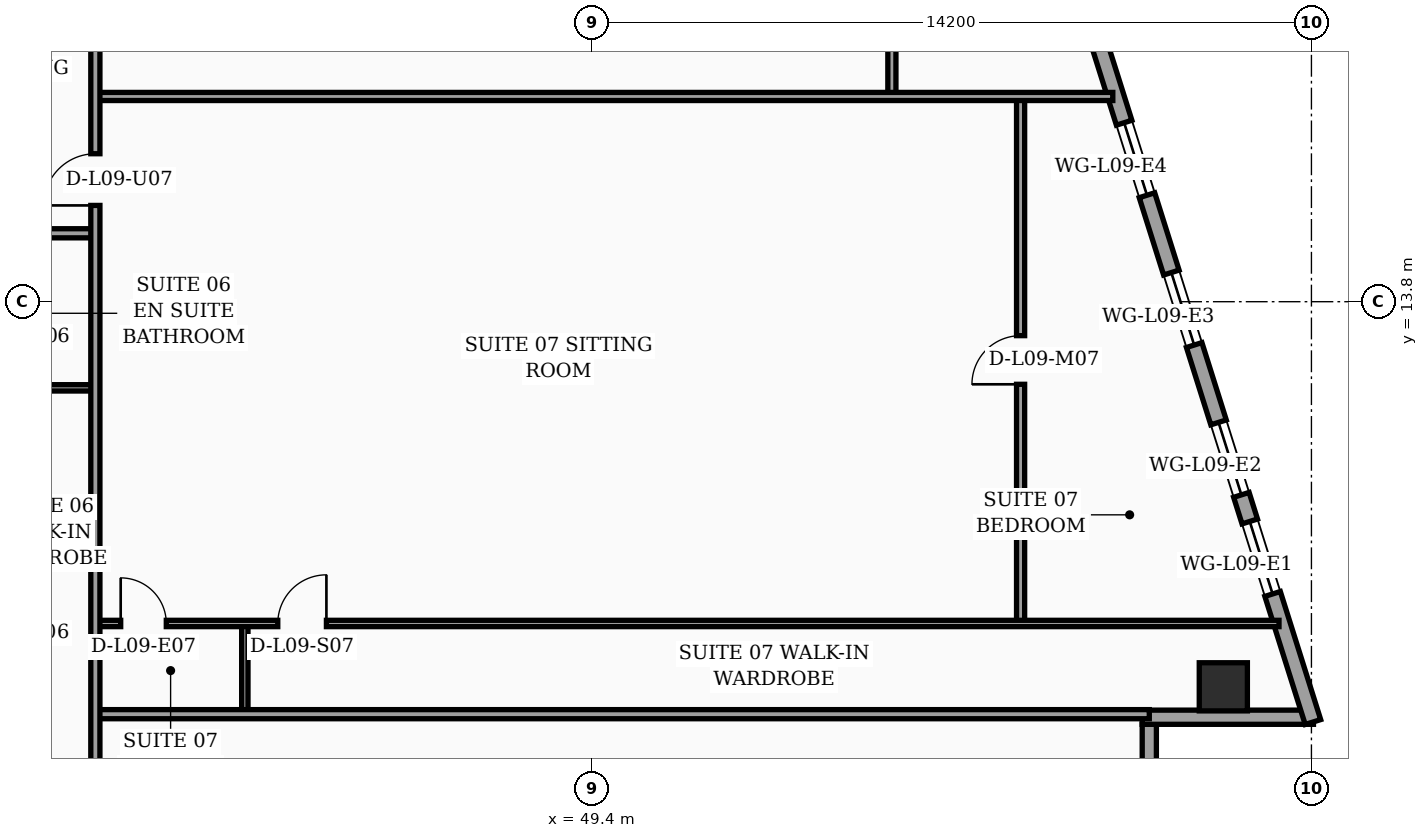
"""IFC4 building model, lengths in metres.
Left out: names, types, materials, properties, quantities, classifications, styles, units other than length and angle.
Written with IfcOpenShell. Run it as: python <this file> out.ifc"""

import sys

from ifc_helpers import new_model, si_unit, direction, frame, frame_2d, origin, origin_2d, place, context, subcontext, project, spatial, rectangle, hollow_rectangle, extrude, element, fill, save


model = new_model("IFC4")
c1 = context("Model", 3, precision=1e-05, world=origin(), true_north=direction((0.0, 1.0)))
c2 = subcontext(c1, "Body", "Model", "MODEL_VIEW")
j1 = project(units=[si_unit("LENGTHUNIT", "METRE"), si_unit("PLANEANGLEUNIT", "RADIAN")], contexts=[c1])
p1 = place(None, origin())
s1 = spatial("IfcSite", under=j1, at=p1, CompositionType="ELEMENT")
p2 = place(p1, origin())
s2 = spatial("IfcBuilding", under=s1, at=p2, CompositionType="ELEMENT")
p3 = place(p2, frame((0.0, 0.0, 42.2)))
s3 = spatial("IfcBuildingStorey", under=s2, at=p3, CompositionType="ELEMENT", Elevation=42.2)
p4 = place(p3, frame((61.861, 6.2, 0.0), z_axis=(0.0, 0.0, 1.0), x_axis=(1.0, 0.0, 0.0)))
e1 = element("IfcColumn", 1, at=p4, inside=s3, PredefinedType="COLUMN", context=c2, shape_type="SweptSolid", body=[
    extrude(hollow_rectangle(XDim=0.95, YDim=0.95, WallThickness=0.04, at=origin_2d()), origin(), (0.0, 0.0, 1.0), 3.52),
])
p5 = place(p3, frame((60.4, 2.52, 0.0), z_axis=(0.0, 0.0, 1.0), x_axis=(0.0, 1.0, 0.0)))
e2 = element("IfcWall", 2, at=p5, inside=s3, PredefinedType="SOLIDWALL", context=c2, shape_type="SweptSolid", body=[
    extrude(rectangle(XDim=2.94, YDim=0.28, at=frame_2d((1.47, 0.0))), origin(), (0.0, 0.0, 1.0), 3.02),
])
p6 = place(p3, frame((60.26, 5.6, 0.0), z_axis=(0.0, 0.0, 1.0), x_axis=(1.0, 0.0, 0.0)))
e3 = element("IfcWall", 3, at=p6, inside=s3, PredefinedType="SOLIDWALL", context=c2, shape_type="SweptSolid", body=[
    extrude(rectangle(XDim=3.38, YDim=0.28, at=frame_2d((1.69, 0.0))), origin(), (0.0, 0.0, 1.0), 3.02),
])
p7 = place(p3, frame((63.63, 5.505, 0.0), z_axis=(0.0, 0.0, 1.0), x_axis=(-0.300501856448, 0.953781229775, 0.0)))
e4 = element("IfcWall", 4, at=p7, inside=s3, PredefinedType="SOLIDWALL", context=c2, shape_type="SweptSolid", body=[
    extrude(rectangle(XDim=30.814, YDim=0.32, at=frame_2d((15.407, 0.0))), origin(), (0.0, 0.0, 1.0), 3.52),
])
p8 = place(p7, frame((18.796, 0.0, 0.0)))
e5 = element("IfcOpeningElement", 5, at=p8, cuts=e4, PredefinedType="OPENING", context=c2, shape_type="SweptSolid", body=[
    extrude(rectangle(XDim=1.4, YDim=2.25, at=frame_2d((0.7, 1.125))), frame((0.0, 0.17, 0.0), z_axis=(0.0, -1.0, 0.0), x_axis=(1.0, 0.0, 0.0)), (0.0, 0.0, 1.0), 0.34),
])
p9 = place(p7, frame((2.65, 0.0, 0.75)))
e6 = element("IfcOpeningElement", 6, at=p9, cuts=e4, PredefinedType="OPENING", context=c2, shape_type="SweptSolid", body=[
    extrude(rectangle(XDim=1.5, YDim=1.6, at=frame_2d((0.75, 0.8))), frame((0.0, 0.17, 0.0), z_axis=(0.0, -1.0, 0.0), x_axis=(1.0, 0.0, 0.0)), (0.0, 0.0, 1.0), 0.34),
])
p10 = place(p7, frame((4.7, 0.0, 0.75)))
e7 = element("IfcOpeningElement", 7, at=p10, cuts=e4, PredefinedType="OPENING", context=c2, shape_type="SweptSolid", body=[
    extrude(rectangle(XDim=1.5, YDim=1.6, at=frame_2d((0.75, 0.8))), frame((0.0, 0.17, 0.0), z_axis=(0.0, -1.0, 0.0), x_axis=(1.0, 0.0, 0.0)), (0.0, 0.0, 1.0), 0.34),
])
p11 = place(p7, frame((7.8, 0.0, 0.75)))
e8 = element("IfcOpeningElement", 8, at=p11, cuts=e4, PredefinedType="OPENING", context=c2, shape_type="SweptSolid", body=[
    extrude(rectangle(XDim=1.5, YDim=1.6, at=frame_2d((0.75, 0.8))), frame((0.0, 0.17, 0.0), z_axis=(0.0, -1.0, 0.0), x_axis=(1.0, 0.0, 0.0)), (0.0, 0.0, 1.0), 0.34),
])
p12 = place(p7, frame((10.9, 0.0, 0.75)))
e9 = element("IfcOpeningElement", 9, at=p12, cuts=e4, PredefinedType="OPENING", context=c2, shape_type="SweptSolid", body=[
    extrude(rectangle(XDim=1.5, YDim=1.6, at=frame_2d((0.75, 0.8))), frame((0.0, 0.17, 0.0), z_axis=(0.0, -1.0, 0.0), x_axis=(1.0, 0.0, 0.0)), (0.0, 0.0, 1.0), 0.34),
])
p13 = place(p7, frame((14.0, 0.0, 0.75)))
e10 = element("IfcOpeningElement", 10, at=p13, cuts=e4, PredefinedType="OPENING", context=c2, shape_type="SweptSolid", body=[
    extrude(rectangle(XDim=1.5, YDim=1.6, at=frame_2d((0.75, 0.8))), frame((0.0, 0.17, 0.0), z_axis=(0.0, -1.0, 0.0), x_axis=(1.0, 0.0, 0.0)), (0.0, 0.0, 1.0), 0.34),
])
p14 = place(p7, frame((16.55, 0.0, 0.75)))
e11 = element("IfcOpeningElement", 11, at=p14, cuts=e4, PredefinedType="OPENING", context=c2, shape_type="SweptSolid", body=[
    extrude(rectangle(XDim=1.5, YDim=1.6, at=frame_2d((0.75, 0.8))), frame((0.0, 0.17, 0.0), z_axis=(0.0, -1.0, 0.0), x_axis=(1.0, 0.0, 0.0)), (0.0, 0.0, 1.0), 0.34),
])
p15 = place(p7, frame((23.3, 0.0, 0.75)))
e12 = element("IfcOpeningElement", 12, at=p15, cuts=e4, PredefinedType="OPENING", context=c2, shape_type="SweptSolid", body=[
    extrude(rectangle(XDim=1.5, YDim=1.6, at=frame_2d((0.75, 0.8))), frame((0.0, 0.17, 0.0), z_axis=(0.0, -1.0, 0.0), x_axis=(1.0, 0.0, 0.0)), (0.0, 0.0, 1.0), 0.34),
])
p16 = place(p7, frame((27.45, 0.0, 0.75)))
e13 = element("IfcOpeningElement", 13, at=p16, cuts=e4, PredefinedType="OPENING", context=c2, shape_type="SweptSolid", body=[
    extrude(rectangle(XDim=1.5, YDim=1.6, at=frame_2d((0.75, 0.8))), frame((0.0, 0.17, 0.0), z_axis=(0.0, -1.0, 0.0), x_axis=(1.0, 0.0, 0.0)), (0.0, 0.0, 1.0), 0.34),
])
p17 = place(p3, frame((37.6, 12.1, 0.0), z_axis=(0.0, 0.0, 1.0), x_axis=(1.0, 0.0, 0.0)))
e14 = element("IfcWall", 14, at=p17, inside=s3, PredefinedType="PARTITIONING", context=c2, shape_type="SweptSolid", body=[
    extrude(rectangle(XDim=2.0, YDim=0.125, at=frame_2d((1.0, 0.0))), origin(), (0.0, 0.0, 1.0), 3.52),
])
p18 = place(p3, frame((32.4, 15.15, 0.0), z_axis=(0.0, 0.0, 1.0), x_axis=(1.0, 0.0, 0.0)))
e15 = element("IfcWall", 15, at=p18, inside=s3, PredefinedType="PARTITIONING", context=c2, shape_type="SweptSolid", body=[
    extrude(rectangle(XDim=7.2, YDim=0.18, at=frame_2d((3.6, 0.0))), origin(), (0.0, 0.0, 1.0), 2.82),
])
p19 = place(p18, frame((2.19, 0.0, 0.0)))
e16 = element("IfcOpeningElement", 16, at=p19, cuts=e15, PredefinedType="OPENING", context=c2, shape_type="SweptSolid", body=[
    extrude(rectangle(XDim=1.02, YDim=2.2, at=frame_2d((0.51, 1.1))), frame((0.0, 0.1, 0.0), z_axis=(0.0, -1.0, 0.0), x_axis=(1.0, 0.0, 0.0)), (0.0, 0.0, 1.0), 0.2),
])
p20 = place(p3, frame((42.55, 5.66, 0.0), z_axis=(0.0, 0.0, 1.0), x_axis=(0.0, 1.0, 0.0)))
e17 = element("IfcWall", 17, at=p20, inside=s3, PredefinedType="PARTITIONING", context=c2, shape_type="SweptSolid", body=[
    extrude(rectangle(XDim=1.79, YDim=0.125, at=frame_2d((0.895, 0.0))), origin(), (0.0, 0.0, 1.0), 3.52),
])
p21 = place(p3, frame((57.86, 7.45, 0.0), z_axis=(0.0, 0.0, 1.0), x_axis=(0.0, 1.0, 0.0)))
e18 = element("IfcWall", 18, at=p21, inside=s3, PredefinedType="PARTITIONING", context=c2, shape_type="SweptSolid", body=[
    extrude(rectangle(XDim=10.4, YDim=0.16, at=frame_2d((5.2, 0.0))), origin(), (0.0, 0.0, 1.0), 3.02),
])
p22 = place(p21, frame((4.72, 0.0, 0.0)))
e19 = element("IfcOpeningElement", 19, at=p22, cuts=e18, PredefinedType="OPENING", context=c2, shape_type="SweptSolid", body=[
    extrude(rectangle(XDim=0.96, YDim=2.2, at=frame_2d((0.48, 1.1))), frame((0.0, 0.09, 0.0), z_axis=(0.0, -1.0, 0.0), x_axis=(1.0, 0.0, 0.0)), (0.0, 0.0, 1.0), 0.18),
])
p23 = place(p3, frame((39.6, 7.45, 0.0), z_axis=(0.0, 0.0, 1.0), x_axis=(1.0, 0.0, 0.0)))
e20 = element("IfcWall", 20, at=p23, inside=s3, PredefinedType="PARTITIONING", context=c2, shape_type="SweptSolid", body=[
    extrude(rectangle(XDim=23.36, YDim=0.125, at=frame_2d((11.68, 0.0))), origin(), (0.0, 0.0, 1.0), 2.82),
])
p24 = place(p23, frame((0.5, 0.0, 0.0)))
e21 = element("IfcOpeningElement", 21, at=p24, cuts=e20, PredefinedType="OPENING", context=c2, shape_type="SweptSolid", body=[
    extrude(rectangle(XDim=0.9, YDim=2.15, at=frame_2d((0.45, 1.075))), frame((0.0, 0.073, 0.0), z_axis=(0.0, -1.0, 0.0), x_axis=(1.0, 0.0, 0.0)), (0.0, 0.0, 1.0), 0.145),
])
p25 = place(p23, frame((3.6, 0.0, 0.0)))
e22 = element("IfcOpeningElement", 22, at=p25, cuts=e20, PredefinedType="OPENING", context=c2, shape_type="SweptSolid", body=[
    extrude(rectangle(XDim=0.96, YDim=2.2, at=frame_2d((0.48, 1.1))), frame((0.0, 0.073, 0.0), z_axis=(0.0, -1.0, 0.0), x_axis=(1.0, 0.0, 0.0)), (0.0, 0.0, 1.0), 0.145),
])
p26 = place(p3, frame((39.6, 5.66, 0.0), z_axis=(0.0, 0.0, 1.0), x_axis=(1.0, 0.0, 0.0)))
e23 = element("IfcWall", 23, at=p26, inside=s3, PredefinedType="PARTITIONING", context=c2, shape_type="SweptSolid", body=[
    extrude(rectangle(XDim=20.8, YDim=0.18, at=frame_2d((10.4, 0.0))), origin(), (0.0, 0.0, 1.0), 2.82),
])
p27 = place(p3, frame((55.32, 17.85, 0.0), z_axis=(0.0, 0.0, 1.0), x_axis=(0.0, 1.0, 0.0)))
e24 = element("IfcWall", 24, at=p27, inside=s3, PredefinedType="PARTITIONING", context=c2, shape_type="SweptSolid", body=[
    extrude(rectangle(XDim=5.74, YDim=0.16, at=frame_2d((2.87, 0.0))), origin(), (0.0, 0.0, 1.0), 2.82),
])
p28 = place(p27, frame((2.39, 0.0, 0.0)))
e25 = element("IfcOpeningElement", 25, at=p28, cuts=e24, PredefinedType="OPENING", context=c2, shape_type="SweptSolid", body=[
    extrude(rectangle(XDim=0.96, YDim=2.2, at=frame_2d((0.48, 1.1))), frame((0.0, 0.09, 0.0), z_axis=(0.0, -1.0, 0.0), x_axis=(1.0, 0.0, 0.0)), (0.0, 0.0, 1.0), 0.18),
])
p29 = place(p3, frame((39.6, 17.85, 0.0), z_axis=(0.0, 0.0, 1.0), x_axis=(1.0, 0.0, 0.0)))
e26 = element("IfcWall", 26, at=p29, inside=s3, PredefinedType="PARTITIONING", context=c2, shape_type="SweptSolid", body=[
    extrude(rectangle(XDim=20.08, YDim=0.16, at=frame_2d((10.04, 0.0))), origin(), (0.0, 0.0, 1.0), 2.82),
])
p30 = place(p3, frame((39.6, 2.44, 0.0), z_axis=(0.0, 0.0, 1.0), x_axis=(0.0, 1.0, 0.0)))
e27 = element("IfcWall", 27, at=p30, inside=s3, PredefinedType="PARTITIONING", context=c2, shape_type="SweptSolid", body=[
    extrude(rectangle(XDim=31.04, YDim=0.18, at=frame_2d((15.52, 0.0))), origin(), (0.0, 0.0, 1.0), 2.82),
])
p31 = place(p30, frame((13.26, 0.0, 0.0)))
e28 = element("IfcOpeningElement", 28, at=p31, cuts=e27, PredefinedType="OPENING", context=c2, shape_type="SweptSolid", body=[
    extrude(rectangle(XDim=1.02, YDim=2.2, at=frame_2d((0.51, 1.1))), frame((0.0, 0.1, 0.0), z_axis=(0.0, -1.0, 0.0), x_axis=(1.0, 0.0, 0.0)), (0.0, 0.0, 1.0), 0.2),
])
p32 = place(p30, frame((17.77, 0.0, 0.0)))
e29 = element("IfcOpeningElement", 29, at=p32, cuts=e27, PredefinedType="OPENING", context=c2, shape_type="SweptSolid", body=[
    extrude(rectangle(XDim=1.02, YDim=2.2, at=frame_2d((0.51, 1.1))), frame((0.0, 0.1, 0.0), z_axis=(0.0, -1.0, 0.0), x_axis=(1.0, 0.0, 0.0)), (0.0, 0.0, 1.0), 0.2),
])
p33 = place(p30, frame((25.58, 0.0, 0.0)))
e30 = element("IfcOpeningElement", 30, at=p33, cuts=e27, PredefinedType="OPENING", context=c2, shape_type="SweptSolid", body=[
    extrude(rectangle(XDim=1.02, YDim=2.2, at=frame_2d((0.51, 1.1))), frame((0.0, 0.1, 0.0), z_axis=(0.0, -1.0, 0.0), x_axis=(1.0, 0.0, 0.0)), (0.0, 0.0, 1.0), 0.2),
])
p34 = place(p9, origin())
e31 = element("IfcWindow", 31, at=p34, inside=s3, PartitioningType="SINGLE_PANEL", PredefinedType="WINDOW", context=c2, shape_type="SweptSolid", body=[
    extrude(rectangle(XDim=1.5, YDim=1.6, at=frame_2d((0.75, 0.8))), frame((0.0, 0.03, 0.0), z_axis=(0.0, -1.0, 0.0), x_axis=(1.0, 0.0, 0.0)), (0.0, 0.0, 1.0), 0.06),
])
fill(e6, e31)
p35 = place(p10, origin())
e32 = element("IfcWindow", 32, at=p35, inside=s3, PartitioningType="SINGLE_PANEL", PredefinedType="WINDOW", context=c2, shape_type="SweptSolid", body=[
    extrude(rectangle(XDim=1.5, YDim=1.6, at=frame_2d((0.75, 0.8))), frame((0.0, 0.03, 0.0), z_axis=(0.0, -1.0, 0.0), x_axis=(1.0, 0.0, 0.0)), (0.0, 0.0, 1.0), 0.06),
])
fill(e7, e32)
p36 = place(p11, origin())
e33 = element("IfcWindow", 33, at=p36, inside=s3, PartitioningType="SINGLE_PANEL", PredefinedType="WINDOW", context=c2, shape_type="SweptSolid", body=[
    extrude(rectangle(XDim=1.5, YDim=1.6, at=frame_2d((0.75, 0.8))), frame((0.0, 0.03, 0.0), z_axis=(0.0, -1.0, 0.0), x_axis=(1.0, 0.0, 0.0)), (0.0, 0.0, 1.0), 0.06),
])
fill(e8, e33)
p37 = place(p12, origin())
e34 = element("IfcWindow", 34, at=p37, inside=s3, PartitioningType="SINGLE_PANEL", PredefinedType="WINDOW", context=c2, shape_type="SweptSolid", body=[
    extrude(rectangle(XDim=1.5, YDim=1.6, at=frame_2d((0.75, 0.8))), frame((0.0, 0.03, 0.0), z_axis=(0.0, -1.0, 0.0), x_axis=(1.0, 0.0, 0.0)), (0.0, 0.0, 1.0), 0.06),
])
fill(e9, e34)
p38 = place(p22, origin())
e35 = element("IfcDoor", 35, at=p38, inside=s3, OperationType="SINGLE_SWING_LEFT", PredefinedType="DOOR", context=c2, shape_type="SweptSolid", body=[
    extrude(rectangle(XDim=0.96, YDim=2.2, at=frame_2d((0.48, 1.1))), frame((0.0, 0.025, 0.0), z_axis=(0.0, -1.0, 0.0), x_axis=(1.0, 0.0, 0.0)), (0.0, 0.0, 1.0), 0.05),
])
fill(e19, e35)
p39 = place(p24, origin())
e36 = element("IfcDoor", 36, at=p39, inside=s3, OperationType="SINGLE_SWING_LEFT", PredefinedType="DOOR", context=c2, shape_type="SweptSolid", body=[
    extrude(rectangle(XDim=0.9, YDim=2.15, at=frame_2d((0.45, 1.075))), frame((0.0, 0.025, 0.0), z_axis=(0.0, -1.0, 0.0), x_axis=(1.0, 0.0, 0.0)), (0.0, 0.0, 1.0), 0.05),
])
fill(e21, e36)
p40 = place(p25, origin())
e37 = element("IfcDoor", 37, at=p40, inside=s3, OperationType="SINGLE_SWING_RIGHT", PredefinedType="DOOR", context=c2, shape_type="SweptSolid", body=[
    extrude(rectangle(XDim=0.96, YDim=2.2, at=frame_2d((0.48, 1.1))), frame((0.0, 0.025, 0.0), z_axis=(0.0, -1.0, 0.0), x_axis=(1.0, 0.0, 0.0)), (0.0, 0.0, 1.0), 0.05),
])
fill(e22, e37)
p41 = place(p31, origin())
e38 = element("IfcDoor", 38, at=p41, inside=s3, OperationType="SINGLE_SWING_LEFT", PredefinedType="DOOR", context=c2, shape_type="SweptSolid", body=[
    extrude(rectangle(XDim=1.02, YDim=2.2, at=frame_2d((0.51, 1.1))), frame((0.0, 0.025, 0.0), z_axis=(0.0, -1.0, 0.0), x_axis=(1.0, 0.0, 0.0)), (0.0, 0.0, 1.0), 0.05),
])
fill(e28, e38)
save(model, sys.argv[1])
